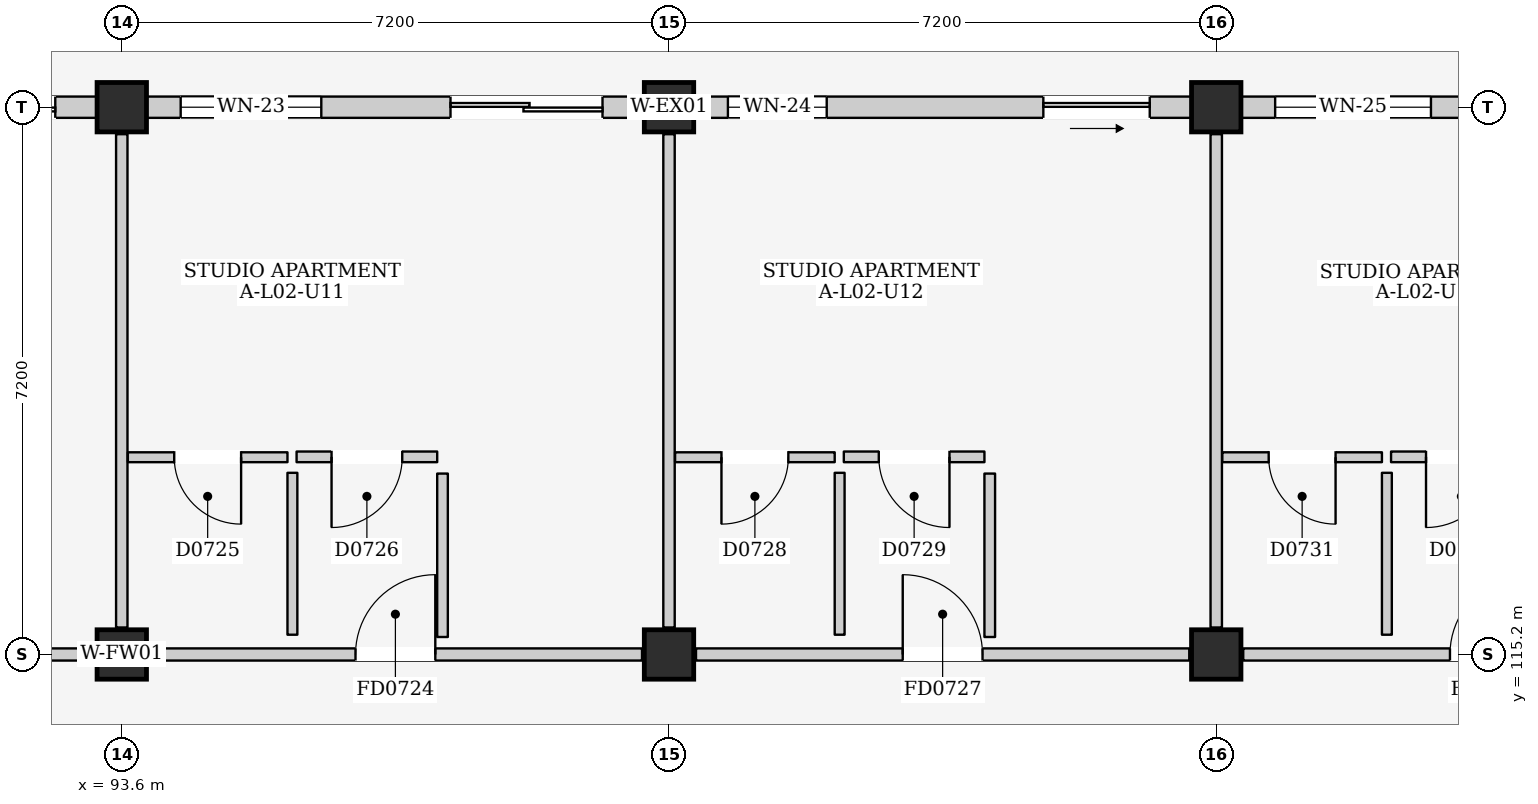
"""IFC4 building model, lengths in metres.
Left out: names, types, materials, properties, quantities, classifications, styles, units other than length and angle.
Written with IfcOpenShell. Run it as: python <this file> out.ifc"""

import sys

from ifc_helpers import new_model, si_unit, direction, frame, frame_2d, origin, origin_2d, place, context, subcontext, project, spatial, rectangle, extrude, element, fill, save


model = new_model("IFC4")
c1 = context("Model", 3, precision=1e-05, world=origin(), true_north=direction((0.0, 1.0)))
c2 = subcontext(c1, "Body", "Model", "MODEL_VIEW")
j1 = project(units=[si_unit("LENGTHUNIT", "METRE"), si_unit("PLANEANGLEUNIT", "RADIAN")], contexts=[c1])
p1 = place(None, origin())
s1 = spatial("IfcSite", under=j1, at=p1, CompositionType="ELEMENT")
p2 = place(p1, origin())
s2 = spatial("IfcBuilding", under=s1, at=p2, CompositionType="ELEMENT")
p3 = place(p2, frame((0.0, 0.0, 9.0)))
s3 = spatial("IfcBuildingStorey", under=s2, at=p3, CompositionType="ELEMENT", Elevation=9.0)
for number, where, z_axis, x_axis in (
    (1, (93.6, 115.2, 0.0), (0.0, 0.0, 1.0), (1.0, 0.0, 0.0)),
    (2, (93.6, 122.4, 0.0), (0.0, 0.0, 1.0), (1.0, 0.0, 0.0)),
    (3, (100.8, 115.2, 0.0), (0.0, 0.0, 1.0), (1.0, 0.0, 0.0)),
    (4, (100.8, 122.4, 0.0), (0.0, 0.0, 1.0), (1.0, 0.0, 0.0)),
    (5, (108.0, 115.2, 0.0), (0.0, 0.0, 1.0), (1.0, 0.0, 0.0)),
    (6, (108.0, 122.4, 0.0), (0.0, 0.0, 1.0), (1.0, 0.0, 0.0)),
):
    element("IfcColumn", number, at=place(p3, frame(where, z_axis=z_axis, x_axis=x_axis)), inside=s3, PredefinedType="COLUMN", context=c2, shape_type="SweptSolid", body=[
        extrude(rectangle(XDim=0.65, YDim=0.65, at=origin_2d()), origin(), (0.0, 0.0, 1.0), 3.2),
    ])
p4 = place(p3, frame((86.725, 122.4, 0.0), z_axis=(0.0, 0.0, 1.0), x_axis=(1.0, 0.0, 0.0)))
e7 = element("IfcWall", 7, at=p4, inside=s3, PredefinedType="ELEMENTEDWALL", context=c2, shape_type="SweptSolid", body=[
    extrude(rectangle(XDim=6.55, YDim=0.28, at=frame_2d((3.275, 0.0))), origin(), (0.0, 0.0, 1.0), 2.425),
])
p5 = place(p4, frame((3.6, 0.0, 0.0)))
e8 = element("IfcOpeningElement", 8, at=p5, cuts=e7, PredefinedType="OPENING", context=c2, shape_type="SweptSolid", body=[
    extrude(rectangle(XDim=2.4, YDim=2.12, at=frame_2d((1.2, 1.06))), frame((0.0, 0.155, 0.0), z_axis=(0.0, -1.0, 0.0), x_axis=(1.0, 0.0, 0.0)), (0.0, 0.0, 1.0), 0.31),
])
p6 = place(p4, frame((0.45, 0.0, 0.865)))
e9 = element("IfcOpeningElement", 9, at=p6, cuts=e7, PredefinedType="OPENING", context=c2, shape_type="SweptSolid", body=[
    extrude(rectangle(XDim=1.55, YDim=1.45, at=frame_2d((0.775, 0.725))), frame((0.0, 0.155, 0.0), z_axis=(0.0, -1.0, 0.0), x_axis=(1.0, 0.0, 0.0)), (0.0, 0.0, 1.0), 0.31),
])
p7 = place(p3, frame((93.925, 122.4, 0.0), z_axis=(0.0, 0.0, 1.0), x_axis=(1.0, 0.0, 0.0)))
e10 = element("IfcWall", 10, at=p7, inside=s3, PredefinedType="ELEMENTEDWALL", context=c2, shape_type="SweptSolid", body=[
    extrude(rectangle(XDim=6.55, YDim=0.28, at=frame_2d((3.275, 0.0))), origin(), (0.0, 0.0, 1.0), 2.425),
])
p8 = place(p7, frame((4.0, 0.0, 0.0)))
e11 = element("IfcOpeningElement", 11, at=p8, cuts=e10, PredefinedType="OPENING", context=c2, shape_type="SweptSolid", body=[
    extrude(rectangle(XDim=2.0, YDim=2.12, at=frame_2d((1.0, 1.06))), frame((0.0, 0.155, 0.0), z_axis=(0.0, -1.0, 0.0), x_axis=(1.0, 0.0, 0.0)), (0.0, 0.0, 1.0), 0.31),
])
p9 = place(p7, frame((0.45, 0.0, 0.9)))
e12 = element("IfcOpeningElement", 12, at=p9, cuts=e10, PredefinedType="OPENING", context=c2, shape_type="SweptSolid", body=[
    extrude(rectangle(XDim=1.85, YDim=1.4, at=frame_2d((0.925, 0.7))), frame((0.0, 0.155, 0.0), z_axis=(0.0, -1.0, 0.0), x_axis=(1.0, 0.0, 0.0)), (0.0, 0.0, 1.0), 0.31),
])
p10 = place(p3, frame((101.125, 122.4, 0.0), z_axis=(0.0, 0.0, 1.0), x_axis=(1.0, 0.0, 0.0)))
e13 = element("IfcWall", 13, at=p10, inside=s3, PredefinedType="ELEMENTEDWALL", context=c2, shape_type="SweptSolid", body=[
    extrude(rectangle(XDim=6.55, YDim=0.28, at=frame_2d((3.275, 0.0))), origin(), (0.0, 0.0, 1.0), 2.425),
])
p11 = place(p10, frame((4.6, 0.0, 0.0)))
e14 = element("IfcOpeningElement", 14, at=p11, cuts=e13, PredefinedType="OPENING", context=c2, shape_type="SweptSolid", body=[
    extrude(rectangle(XDim=1.4, YDim=2.1, at=frame_2d((0.7, 1.05))), frame((0.0, 0.155, 0.0), z_axis=(0.0, -1.0, 0.0), x_axis=(1.0, 0.0, 0.0)), (0.0, 0.0, 1.0), 0.31),
])
p12 = place(p10, frame((0.45, 0.0, 0.9)))
e15 = element("IfcOpeningElement", 15, at=p12, cuts=e13, PredefinedType="OPENING", context=c2, shape_type="SweptSolid", body=[
    extrude(rectangle(XDim=1.3, YDim=1.25, at=frame_2d((0.65, 0.625))), frame((0.0, 0.155, 0.0), z_axis=(0.0, -1.0, 0.0), x_axis=(1.0, 0.0, 0.0)), (0.0, 0.0, 1.0), 0.31),
])
p13 = place(p3, frame((108.325, 122.4, 0.0), z_axis=(0.0, 0.0, 1.0), x_axis=(1.0, 0.0, 0.0)))
e16 = element("IfcWall", 16, at=p13, inside=s3, PredefinedType="ELEMENTEDWALL", context=c2, shape_type="SweptSolid", body=[
    extrude(rectangle(XDim=6.55, YDim=0.28, at=frame_2d((3.275, 0.0))), origin(), (0.0, 0.0, 1.0), 2.425),
])
p14 = place(p13, frame((4.2, 0.0, 0.0)))
e17 = element("IfcOpeningElement", 17, at=p14, cuts=e16, PredefinedType="OPENING", context=c2, shape_type="SweptSolid", body=[
    extrude(rectangle(XDim=1.8, YDim=2.12, at=frame_2d((0.9, 1.06))), frame((0.0, 0.155, 0.0), z_axis=(0.0, -1.0, 0.0), x_axis=(1.0, 0.0, 0.0)), (0.0, 0.0, 1.0), 0.31),
])
p15 = place(p13, frame((0.45, 0.0, 0.715)))
e18 = element("IfcOpeningElement", 18, at=p15, cuts=e16, PredefinedType="OPENING", context=c2, shape_type="SweptSolid", body=[
    extrude(rectangle(XDim=2.05, YDim=1.6, at=frame_2d((1.025, 0.8))), frame((0.0, 0.155, 0.0), z_axis=(0.0, -1.0, 0.0), x_axis=(1.0, 0.0, 0.0)), (0.0, 0.0, 1.0), 0.31),
])
p16 = place(p3, frame((86.755, 115.2, 0.0), z_axis=(0.0, 0.0, 1.0), x_axis=(1.0, 0.0, 0.0)))
e19 = element("IfcWall", 19, at=p16, inside=s3, PredefinedType="PARTITIONING", context=c2, shape_type="SweptSolid", body=[
    extrude(rectangle(XDim=6.49, YDim=0.16, at=frame_2d((3.245, 0.0))), origin(), (0.0, 0.0, 1.0), 2.295),
])
p17 = place(p16, frame((2.72, 0.0, 0.0)))
e20 = element("IfcOpeningElement", 20, at=p17, cuts=e19, PredefinedType="OPENING", context=c2, shape_type="SweptSolid", body=[
    extrude(rectangle(XDim=1.05, YDim=2.15, at=frame_2d((0.525, 1.075))), frame((0.0, 0.095, 0.0), z_axis=(0.0, -1.0, 0.0), x_axis=(1.0, 0.0, 0.0)), (0.0, 0.0, 1.0), 0.19),
])
p18 = place(p3, frame((93.6, 115.555, 0.0), z_axis=(0.0, 0.0, 1.0), x_axis=(0.0, 1.0, 0.0)))
e21 = element("IfcWall", 21, at=p18, inside=s3, PredefinedType="PARTITIONING", context=c2, shape_type="SweptSolid", body=[
    extrude(rectangle(XDim=6.49, YDim=0.15, at=frame_2d((3.245, 0.0))), origin(), (0.0, 0.0, 1.0), 2.395),
])
p19 = place(p3, frame((93.955, 115.2, 0.0), z_axis=(0.0, 0.0, 1.0), x_axis=(1.0, 0.0, 0.0)))
e22 = element("IfcWall", 22, at=p19, inside=s3, PredefinedType="PARTITIONING", context=c2, shape_type="SweptSolid", body=[
    extrude(rectangle(XDim=6.49, YDim=0.16, at=frame_2d((3.245, 0.0))), origin(), (0.0, 0.0, 1.0), 2.295),
])
p20 = place(p19, frame((2.72, 0.0, 0.0)))
e23 = element("IfcOpeningElement", 23, at=p20, cuts=e22, PredefinedType="OPENING", context=c2, shape_type="SweptSolid", body=[
    extrude(rectangle(XDim=1.05, YDim=2.15, at=frame_2d((0.525, 1.075))), frame((0.0, 0.095, 0.0), z_axis=(0.0, -1.0, 0.0), x_axis=(1.0, 0.0, 0.0)), (0.0, 0.0, 1.0), 0.19),
])
p21 = place(p3, frame((100.8, 115.555, 0.0), z_axis=(0.0, 0.0, 1.0), x_axis=(0.0, 1.0, 0.0)))
e24 = element("IfcWall", 24, at=p21, inside=s3, PredefinedType="PARTITIONING", context=c2, shape_type="SweptSolid", body=[
    extrude(rectangle(XDim=6.49, YDim=0.15, at=frame_2d((3.245, 0.0))), origin(), (0.0, 0.0, 1.0), 2.395),
])
p22 = place(p3, frame((93.68, 117.795, 0.0), z_axis=(0.0, 0.0, 1.0), x_axis=(1.0, 0.0, 0.0)))
e25 = element("IfcWall", 25, at=p22, inside=s3, PredefinedType="PARTITIONING", context=c2, shape_type="SweptSolid", body=[
    extrude(rectangle(XDim=2.1, YDim=0.13, at=frame_2d((1.05, 0.0))), origin(), (0.0, 0.0, 1.0), 2.96),
])
p23 = place(p22, frame((0.61, 0.0, 0.0)))
e26 = element("IfcOpeningElement", 26, at=p23, cuts=e25, PredefinedType="OPENING", context=c2, shape_type="SweptSolid", body=[
    extrude(rectangle(XDim=0.88, YDim=2.1, at=frame_2d((0.44, 1.05))), frame((0.0, 0.08, 0.0), z_axis=(0.0, -1.0, 0.0), x_axis=(1.0, 0.0, 0.0)), (0.0, 0.0, 1.0), 0.16),
])
p24 = place(p3, frame((95.845, 115.46, 0.0), z_axis=(0.0, 0.0, 1.0), x_axis=(0.0, 1.0, 0.0)))
e27 = element("IfcWall", 27, at=p24, inside=s3, PredefinedType="PARTITIONING", context=c2, shape_type="SweptSolid", body=[
    extrude(rectangle(XDim=2.13, YDim=0.13, at=frame_2d((1.065, 0.0))), origin(), (0.0, 0.0, 1.0), 2.96),
])
p25 = place(p3, frame((95.9, 117.8, 0.0), z_axis=(0.0, 0.0, 1.0), x_axis=(1.0, 0.0, 0.0)))
e28 = element("IfcWall", 28, at=p25, inside=s3, PredefinedType="PARTITIONING", context=c2, shape_type="SweptSolid", body=[
    extrude(rectangle(XDim=1.85, YDim=0.14, at=frame_2d((0.925, 0.0))), origin(), (0.0, 0.0, 1.0), 2.96),
])
p26 = place(p25, frame((0.46, 0.0, 0.0)))
e29 = element("IfcOpeningElement", 29, at=p26, cuts=e28, PredefinedType="OPENING", context=c2, shape_type="SweptSolid", body=[
    extrude(rectangle(XDim=0.93, YDim=2.14, at=frame_2d((0.465, 1.07))), frame((0.0, 0.085, 0.0), z_axis=(0.0, -1.0, 0.0), x_axis=(1.0, 0.0, 0.0)), (0.0, 0.0, 1.0), 0.17),
])
p27 = place(p3, frame((97.82, 115.43, 0.0), z_axis=(0.0, 0.0, 1.0), x_axis=(0.0, 1.0, 0.0)))
e30 = element("IfcWall", 30, at=p27, inside=s3, PredefinedType="PARTITIONING", context=c2, shape_type="SweptSolid", body=[
    extrude(rectangle(XDim=2.15, YDim=0.14, at=frame_2d((1.075, 0.0))), origin(), (0.0, 0.0, 1.0), 2.96),
])
p28 = place(p3, frame((101.155, 115.2, 0.0), z_axis=(0.0, 0.0, 1.0), x_axis=(1.0, 0.0, 0.0)))
e31 = element("IfcWall", 31, at=p28, inside=s3, PredefinedType="PARTITIONING", context=c2, shape_type="SweptSolid", body=[
    extrude(rectangle(XDim=6.49, YDim=0.16, at=frame_2d((3.245, 0.0))), origin(), (0.0, 0.0, 1.0), 2.295),
])
p29 = place(p28, frame((2.72, 0.0, 0.0)))
e32 = element("IfcOpeningElement", 32, at=p29, cuts=e31, PredefinedType="OPENING", context=c2, shape_type="SweptSolid", body=[
    extrude(rectangle(XDim=1.05, YDim=2.15, at=frame_2d((0.525, 1.075))), frame((0.0, 0.095, 0.0), z_axis=(0.0, -1.0, 0.0), x_axis=(1.0, 0.0, 0.0)), (0.0, 0.0, 1.0), 0.19),
])
p30 = place(p3, frame((108.0, 115.555, 0.0), z_axis=(0.0, 0.0, 1.0), x_axis=(0.0, 1.0, 0.0)))
e33 = element("IfcWall", 33, at=p30, inside=s3, PredefinedType="PARTITIONING", context=c2, shape_type="SweptSolid", body=[
    extrude(rectangle(XDim=6.49, YDim=0.15, at=frame_2d((3.245, 0.0))), origin(), (0.0, 0.0, 1.0), 2.395),
])
p31 = place(p3, frame((100.88, 117.795, 0.0), z_axis=(0.0, 0.0, 1.0), x_axis=(1.0, 0.0, 0.0)))
e34 = element("IfcWall", 34, at=p31, inside=s3, PredefinedType="PARTITIONING", context=c2, shape_type="SweptSolid", body=[
    extrude(rectangle(XDim=2.1, YDim=0.13, at=frame_2d((1.05, 0.0))), origin(), (0.0, 0.0, 1.0), 2.96),
])
p32 = place(p31, frame((0.61, 0.0, 0.0)))
e35 = element("IfcOpeningElement", 35, at=p32, cuts=e34, PredefinedType="OPENING", context=c2, shape_type="SweptSolid", body=[
    extrude(rectangle(XDim=0.88, YDim=2.1, at=frame_2d((0.44, 1.05))), frame((0.0, 0.08, 0.0), z_axis=(0.0, -1.0, 0.0), x_axis=(1.0, 0.0, 0.0)), (0.0, 0.0, 1.0), 0.16),
])
p33 = place(p3, frame((103.045, 115.46, 0.0), z_axis=(0.0, 0.0, 1.0), x_axis=(0.0, 1.0, 0.0)))
e36 = element("IfcWall", 36, at=p33, inside=s3, PredefinedType="PARTITIONING", context=c2, shape_type="SweptSolid", body=[
    extrude(rectangle(XDim=2.13, YDim=0.13, at=frame_2d((1.065, 0.0))), origin(), (0.0, 0.0, 1.0), 2.96),
])
p34 = place(p3, frame((103.1, 117.8, 0.0), z_axis=(0.0, 0.0, 1.0), x_axis=(1.0, 0.0, 0.0)))
e37 = element("IfcWall", 37, at=p34, inside=s3, PredefinedType="PARTITIONING", context=c2, shape_type="SweptSolid", body=[
    extrude(rectangle(XDim=1.85, YDim=0.14, at=frame_2d((0.925, 0.0))), origin(), (0.0, 0.0, 1.0), 2.96),
])
p35 = place(p34, frame((0.46, 0.0, 0.0)))
e38 = element("IfcOpeningElement", 38, at=p35, cuts=e37, PredefinedType="OPENING", context=c2, shape_type="SweptSolid", body=[
    extrude(rectangle(XDim=0.93, YDim=2.14, at=frame_2d((0.465, 1.07))), frame((0.0, 0.085, 0.0), z_axis=(0.0, -1.0, 0.0), x_axis=(1.0, 0.0, 0.0)), (0.0, 0.0, 1.0), 0.17),
])
p36 = place(p3, frame((105.02, 115.43, 0.0), z_axis=(0.0, 0.0, 1.0), x_axis=(0.0, 1.0, 0.0)))
e39 = element("IfcWall", 39, at=p36, inside=s3, PredefinedType="PARTITIONING", context=c2, shape_type="SweptSolid", body=[
    extrude(rectangle(XDim=2.15, YDim=0.14, at=frame_2d((1.075, 0.0))), origin(), (0.0, 0.0, 1.0), 2.96),
])
p37 = place(p3, frame((108.355, 115.2, 0.0), z_axis=(0.0, 0.0, 1.0), x_axis=(1.0, 0.0, 0.0)))
e40 = element("IfcWall", 40, at=p37, inside=s3, PredefinedType="PARTITIONING", context=c2, shape_type="SweptSolid", body=[
    extrude(rectangle(XDim=6.49, YDim=0.16, at=frame_2d((3.245, 0.0))), origin(), (0.0, 0.0, 1.0), 2.295),
])
p38 = place(p37, frame((2.72, 0.0, 0.0)))
e41 = element("IfcOpeningElement", 41, at=p38, cuts=e40, PredefinedType="OPENING", context=c2, shape_type="SweptSolid", body=[
    extrude(rectangle(XDim=1.05, YDim=2.15, at=frame_2d((0.525, 1.075))), frame((0.0, 0.095, 0.0), z_axis=(0.0, -1.0, 0.0), x_axis=(1.0, 0.0, 0.0)), (0.0, 0.0, 1.0), 0.19),
])
p39 = place(p3, frame((108.08, 117.795, 0.0), z_axis=(0.0, 0.0, 1.0), x_axis=(1.0, 0.0, 0.0)))
e42 = element("IfcWall", 42, at=p39, inside=s3, PredefinedType="PARTITIONING", context=c2, shape_type="SweptSolid", body=[
    extrude(rectangle(XDim=2.1, YDim=0.13, at=frame_2d((1.05, 0.0))), origin(), (0.0, 0.0, 1.0), 2.96),
])
p40 = place(p39, frame((0.61, 0.0, 0.0)))
e43 = element("IfcOpeningElement", 43, at=p40, cuts=e42, PredefinedType="OPENING", context=c2, shape_type="SweptSolid", body=[
    extrude(rectangle(XDim=0.88, YDim=2.1, at=frame_2d((0.44, 1.05))), frame((0.0, 0.08, 0.0), z_axis=(0.0, -1.0, 0.0), x_axis=(1.0, 0.0, 0.0)), (0.0, 0.0, 1.0), 0.16),
])
p41 = place(p3, frame((110.245, 115.46, 0.0), z_axis=(0.0, 0.0, 1.0), x_axis=(0.0, 1.0, 0.0)))
e44 = element("IfcWall", 44, at=p41, inside=s3, PredefinedType="PARTITIONING", context=c2, shape_type="SweptSolid", body=[
    extrude(rectangle(XDim=2.13, YDim=0.13, at=frame_2d((1.065, 0.0))), origin(), (0.0, 0.0, 1.0), 2.96),
])
p42 = place(p3, frame((110.3, 117.8, 0.0), z_axis=(0.0, 0.0, 1.0), x_axis=(1.0, 0.0, 0.0)))
e45 = element("IfcWall", 45, at=p42, inside=s3, PredefinedType="PARTITIONING", context=c2, shape_type="SweptSolid", body=[
    extrude(rectangle(XDim=1.85, YDim=0.14, at=frame_2d((0.925, 0.0))), origin(), (0.0, 0.0, 1.0), 2.96),
])
p43 = place(p42, frame((0.46, 0.0, 0.0)))
e46 = element("IfcOpeningElement", 46, at=p43, cuts=e45, PredefinedType="OPENING", context=c2, shape_type="SweptSolid", body=[
    extrude(rectangle(XDim=0.93, YDim=2.14, at=frame_2d((0.465, 1.07))), frame((0.0, 0.085, 0.0), z_axis=(0.0, -1.0, 0.0), x_axis=(1.0, 0.0, 0.0)), (0.0, 0.0, 1.0), 0.17),
])
p44 = place(p5, frame((2.4, 0.0, 0.0), z_axis=(0.0, 0.0, 1.0), x_axis=(-1.0, 0.0, 0.0)))
e47 = element("IfcDoor", 47, at=p44, inside=s3, OperationType="DOUBLE_DOOR_SLIDING", PredefinedType="DOOR", context=c2, shape_type="SweptSolid", body=[
    extrude(rectangle(XDim=2.4, YDim=2.12, at=frame_2d((1.2, 1.06))), frame((0.0, 0.025, 0.0), z_axis=(0.0, -1.0, 0.0), x_axis=(1.0, 0.0, 0.0)), (0.0, 0.0, 1.0), 0.05),
])
fill(e8, e47)
p45 = place(p8, frame((2.0, 0.0, 0.0), z_axis=(0.0, 0.0, 1.0), x_axis=(-1.0, 0.0, 0.0)))
e48 = element("IfcDoor", 48, at=p45, inside=s3, OperationType="DOUBLE_DOOR_SLIDING", PredefinedType="DOOR", context=c2, shape_type="SweptSolid", body=[
    extrude(rectangle(XDim=2.0, YDim=2.12, at=frame_2d((1.0, 1.06))), frame((0.0, 0.025, 0.0), z_axis=(0.0, -1.0, 0.0), x_axis=(1.0, 0.0, 0.0)), (0.0, 0.0, 1.0), 0.05),
])
fill(e11, e48)
p46 = place(p9, origin())
e49 = element("IfcWindow", 49, at=p46, inside=s3, PartitioningType="DOUBLE_PANEL_VERTICAL", PredefinedType="WINDOW", context=c2, shape_type="SweptSolid", body=[
    extrude(rectangle(XDim=1.85, YDim=1.4, at=frame_2d((0.925, 0.7))), frame((0.0, 0.03, 0.0), z_axis=(0.0, -1.0, 0.0), x_axis=(1.0, 0.0, 0.0)), (0.0, 0.0, 1.0), 0.06),
])
fill(e12, e49)
p47 = place(p11, frame((1.4, 0.0, 0.0), z_axis=(0.0, 0.0, 1.0), x_axis=(-1.0, 0.0, 0.0)))
e50 = element("IfcDoor", 50, at=p47, inside=s3, OperationType="SLIDING_TO_RIGHT", PredefinedType="DOOR", context=c2, shape_type="SweptSolid", body=[
    extrude(rectangle(XDim=1.4, YDim=2.1, at=frame_2d((0.7, 1.05))), frame((0.0, 0.025, 0.0), z_axis=(0.0, -1.0, 0.0), x_axis=(1.0, 0.0, 0.0)), (0.0, 0.0, 1.0), 0.05),
])
fill(e14, e50)
p48 = place(p12, origin())
e51 = element("IfcWindow", 51, at=p48, inside=s3, PartitioningType="SINGLE_PANEL", PredefinedType="WINDOW", context=c2, shape_type="SweptSolid", body=[
    extrude(rectangle(XDim=1.3, YDim=1.25, at=frame_2d((0.65, 0.625))), frame((0.0, 0.03, 0.0), z_axis=(0.0, -1.0, 0.0), x_axis=(1.0, 0.0, 0.0)), (0.0, 0.0, 1.0), 0.06),
])
fill(e15, e51)
p49 = place(p15, origin())
e52 = element("IfcWindow", 52, at=p49, inside=s3, PartitioningType="DOUBLE_PANEL_VERTICAL", PredefinedType="WINDOW", context=c2, shape_type="SweptSolid", body=[
    extrude(rectangle(XDim=2.05, YDim=1.6, at=frame_2d((1.025, 0.8))), frame((0.0, 0.03, 0.0), z_axis=(0.0, -1.0, 0.0), x_axis=(1.0, 0.0, 0.0)), (0.0, 0.0, 1.0), 0.06),
])
fill(e18, e52)
p50 = place(p20, origin())
e53 = element("IfcDoor", 53, at=p50, inside=s3, OperationType="SINGLE_SWING_RIGHT", PredefinedType="DOOR", context=c2, shape_type="SweptSolid", body=[
    extrude(rectangle(XDim=1.05, YDim=2.15, at=frame_2d((0.525, 1.075))), frame((0.0, 0.025, 0.0), z_axis=(0.0, -1.0, 0.0), x_axis=(1.0, 0.0, 0.0)), (0.0, 0.0, 1.0), 0.05),
])
fill(e23, e53)
p51 = place(p23, frame((0.88, 0.0, 0.0), z_axis=(0.0, 0.0, 1.0), x_axis=(-1.0, 0.0, 0.0)))
e54 = element("IfcDoor", 54, at=p51, inside=s3, OperationType="SINGLE_SWING_LEFT", PredefinedType="DOOR", context=c2, shape_type="SweptSolid", body=[
    extrude(rectangle(XDim=0.88, YDim=2.1, at=frame_2d((0.44, 1.05))), frame((0.0, 0.025, 0.0), z_axis=(0.0, -1.0, 0.0), x_axis=(1.0, 0.0, 0.0)), (0.0, 0.0, 1.0), 0.05),
])
fill(e26, e54)
p52 = place(p26, frame((0.93, 0.0, 0.0), z_axis=(0.0, 0.0, 1.0), x_axis=(-1.0, 0.0, 0.0)))
e55 = element("IfcDoor", 55, at=p52, inside=s3, OperationType="SINGLE_SWING_RIGHT", PredefinedType="DOOR", context=c2, shape_type="SweptSolid", body=[
    extrude(rectangle(XDim=0.93, YDim=2.14, at=frame_2d((0.465, 1.07))), frame((0.0, 0.025, 0.0), z_axis=(0.0, -1.0, 0.0), x_axis=(1.0, 0.0, 0.0)), (0.0, 0.0, 1.0), 0.05),
])
fill(e29, e55)
p53 = place(p29, origin())
e56 = element("IfcDoor", 56, at=p53, inside=s3, OperationType="SINGLE_SWING_LEFT", PredefinedType="DOOR", context=c2, shape_type="SweptSolid", body=[
    extrude(rectangle(XDim=1.05, YDim=2.15, at=frame_2d((0.525, 1.075))), frame((0.0, 0.025, 0.0), z_axis=(0.0, -1.0, 0.0), x_axis=(1.0, 0.0, 0.0)), (0.0, 0.0, 1.0), 0.05),
])
fill(e32, e56)
p54 = place(p32, frame((0.88, 0.0, 0.0), z_axis=(0.0, 0.0, 1.0), x_axis=(-1.0, 0.0, 0.0)))
e57 = element("IfcDoor", 57, at=p54, inside=s3, OperationType="SINGLE_SWING_RIGHT", PredefinedType="DOOR", context=c2, shape_type="SweptSolid", body=[
    extrude(rectangle(XDim=0.88, YDim=2.1, at=frame_2d((0.44, 1.05))), frame((0.0, 0.025, 0.0), z_axis=(0.0, -1.0, 0.0), x_axis=(1.0, 0.0, 0.0)), (0.0, 0.0, 1.0), 0.05),
])
fill(e35, e57)
p55 = place(p35, frame((0.93, 0.0, 0.0), z_axis=(0.0, 0.0, 1.0), x_axis=(-1.0, 0.0, 0.0)))
e58 = element("IfcDoor", 58, at=p55, inside=s3, OperationType="SINGLE_SWING_LEFT", PredefinedType="DOOR", context=c2, shape_type="SweptSolid", body=[
    extrude(rectangle(XDim=0.93, YDim=2.14, at=frame_2d((0.465, 1.07))), frame((0.0, 0.025, 0.0), z_axis=(0.0, -1.0, 0.0), x_axis=(1.0, 0.0, 0.0)), (0.0, 0.0, 1.0), 0.05),
])
fill(e38, e58)
p56 = place(p38, origin())
e59 = element("IfcDoor", 59, at=p56, inside=s3, OperationType="SINGLE_SWING_RIGHT", PredefinedType="DOOR", context=c2, shape_type="SweptSolid", body=[
    extrude(rectangle(XDim=1.05, YDim=2.15, at=frame_2d((0.525, 1.075))), frame((0.0, 0.025, 0.0), z_axis=(0.0, -1.0, 0.0), x_axis=(1.0, 0.0, 0.0)), (0.0, 0.0, 1.0), 0.05),
])
fill(e41, e59)
p57 = place(p40, frame((0.88, 0.0, 0.0), z_axis=(0.0, 0.0, 1.0), x_axis=(-1.0, 0.0, 0.0)))
e60 = element("IfcDoor", 60, at=p57, inside=s3, OperationType="SINGLE_SWING_LEFT", PredefinedType="DOOR", context=c2, shape_type="SweptSolid", body=[
    extrude(rectangle(XDim=0.88, YDim=2.1, at=frame_2d((0.44, 1.05))), frame((0.0, 0.025, 0.0), z_axis=(0.0, -1.0, 0.0), x_axis=(1.0, 0.0, 0.0)), (0.0, 0.0, 1.0), 0.05),
])
fill(e43, e60)
p58 = place(p43, frame((0.93, 0.0, 0.0), z_axis=(0.0, 0.0, 1.0), x_axis=(-1.0, 0.0, 0.0)))
e61 = element("IfcDoor", 61, at=p58, inside=s3, OperationType="SINGLE_SWING_RIGHT", PredefinedType="DOOR", context=c2, shape_type="SweptSolid", body=[
    extrude(rectangle(XDim=0.93, YDim=2.14, at=frame_2d((0.465, 1.07))), frame((0.0, 0.025, 0.0), z_axis=(0.0, -1.0, 0.0), x_axis=(1.0, 0.0, 0.0)), (0.0, 0.0, 1.0), 0.05),
])
fill(e46, e61)
save(model, sys.argv[1])
